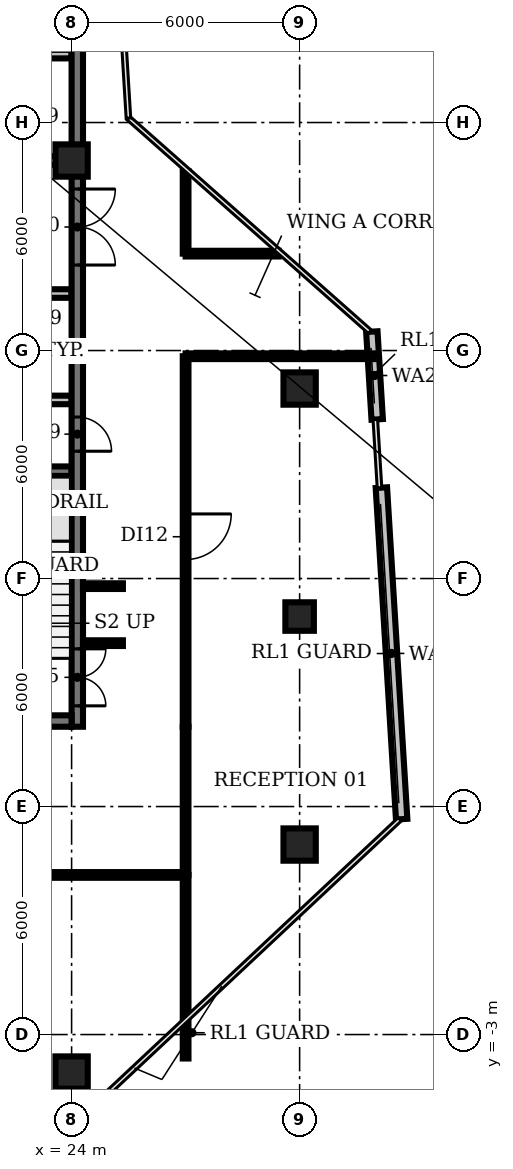
"""IFC4 building model, lengths in metres.
Left out: names, types, materials, properties, quantities, classifications, styles, units other than length and angle.
Written with IfcOpenShell. Run it as: python <this file> out.ifc"""

import sys

from ifc_helpers import new_model, si_unit, direction, frame, frame_2d, origin, origin_2d, place, context, subcontext, project, spatial, rectangle, circle, extrude, element, fill, save


model = new_model("IFC4")
c1 = context("Model", 3, precision=1e-05, world=origin(), true_north=direction((0.0, 1.0)))
c2 = subcontext(c1, "Body", "Model", "MODEL_VIEW")
j1 = project(units=[si_unit("LENGTHUNIT", "METRE"), si_unit("PLANEANGLEUNIT", "RADIAN")], contexts=[c1])
p1 = place(None, origin())
s1 = spatial("IfcSite", under=j1, at=p1, CompositionType="ELEMENT")
p2 = place(p1, origin())
s2 = spatial("IfcBuilding", under=s1, at=p2, CompositionType="ELEMENT")
p3 = place(p2, frame((0.0, 0.0, 302.0)))
s3 = spatial("IfcBuildingStorey", under=s2, at=p3, CompositionType="ELEMENT", Elevation=302.0)
for number, where, z_axis, x_axis in (
    (1, (24.0, -4.0, 0.0), (0.0, 0.0, 1.0), (1.0, 0.0, 0.0)),
    (2, (24.0, 20.0, 0.0), (0.0, 0.0, 1.0), (1.0, 0.0, 0.0)),
    (3, (30.0, 2.0, 0.0), (0.0, 0.0, 1.0), (1.0, 0.0, 0.0)),
):
    element("IfcColumn", number, at=place(p3, frame(where, z_axis=z_axis, x_axis=x_axis)), inside=s3, PredefinedType="COLUMN", context=c2, shape_type="SweptSolid", body=[
        extrude(circle(Radius=0.425, at=origin_2d()), origin(), (0.0, 0.0, 1.0), 3.85),
    ])
p4 = place(p3, frame((30.0, 8.0, 0.0), z_axis=(0.0, 0.0, 1.0), x_axis=(1.0, 0.0, 0.0)))
e4 = element("IfcColumn", 4, at=p4, inside=s3, PredefinedType="COLUMN", context=c2, shape_type="SweptSolid", body=[
    extrude(rectangle(XDim=0.75, YDim=0.75, at=origin_2d()), origin(), (0.0, 0.0, 1.0), 3.85),
])
p5 = place(p3, frame((30.0, 14.0, 0.0), z_axis=(0.0, 0.0, 1.0), x_axis=(1.0, 0.0, 0.0)))
e5 = element("IfcColumn", 5, at=p5, inside=s3, PredefinedType="COLUMN", context=c2, shape_type="SweptSolid", body=[
    extrude(circle(Radius=0.425, at=origin_2d()), origin(), (0.0, 0.0, 1.0), 3.85),
])
p6 = place(p3, frame((32.685, 2.668, 0.0), z_axis=(0.0, 0.0, 1.0), x_axis=(-0.061063491269, 0.998133883822, 0.0)))
e6 = element("IfcWall", 6, at=p6, inside=s3, PredefinedType="SOLIDWALL", context=c2, shape_type="SweptSolid", body=[
    extrude(rectangle(XDim=8.74, YDim=0.3, at=frame_2d((4.37, 0.0))), origin(), (0.0, 0.0, 1.0), 3.85),
])
p7 = place(p3, frame((32.041, 13.188, 0.0), z_axis=(0.0, 0.0, 1.0), x_axis=(-0.060998486175, 0.998137858557, 0.0)))
e7 = element("IfcWall", 7, at=p7, inside=s3, PredefinedType="SOLIDWALL", context=c2, shape_type="SweptSolid", body=[
    extrude(rectangle(XDim=2.313, YDim=0.3, at=frame_2d((1.157, 0.0))), origin(), (0.0, 0.0, 1.0), 3.85),
])
p8 = place(p3, frame((20.85, 11.825, 0.0), z_axis=(0.0, 0.0, 1.0), x_axis=(1.0, 0.0, 0.0)))
e8 = element("IfcWall", 8, at=p8, inside=s3, PredefinedType="SHEAR", context=c2, shape_type="SweptSolid", body=[
    extrude(rectangle(XDim=3.15, YDim=0.25, at=frame_2d((1.575, 0.0))), origin(), (0.0, 0.0, 1.0), 3.85),
])
p9 = place(p3, frame((16.6, 13.7, 0.0), z_axis=(0.0, 0.0, 1.0), x_axis=(1.0, 0.0, 0.0)))
e9 = element("IfcWall", 9, at=p9, inside=s3, PredefinedType="PARTITIONING", context=c2, shape_type="SweptSolid", body=[
    extrude(rectangle(XDim=7.4, YDim=0.225, at=frame_2d((3.7, 0.0))), origin(), (0.0, 0.0, 1.0), 3.85),
])
p10 = place(p3, frame((9.4, 16.5, 0.0), z_axis=(0.0, 0.0, 1.0), x_axis=(1.0, 0.0, 0.0)))
e10 = element("IfcWall", 10, at=p10, inside=s3, PredefinedType="PARTITIONING", context=c2, shape_type="SweptSolid", body=[
    extrude(rectangle(XDim=14.6, YDim=0.225, at=frame_2d((7.3, 0.0))), origin(), (0.0, 0.0, 1.0), 3.85),
])
p11 = place(p10, frame((0.85, 0.0, 0.0)))
e11 = element("IfcOpeningElement", 11, at=p11, cuts=e10, PredefinedType="OPENING", context=c2, shape_type="SweptSolid", body=[
    extrude(rectangle(XDim=0.9, YDim=2.1, at=frame_2d((0.45, 1.05))), frame((0.0, 0.123, 0.0), z_axis=(0.0, -1.0, 0.0), x_axis=(1.0, 0.0, 0.0)), (0.0, 0.0, 1.0), 0.245),
])
p12 = place(p10, frame((3.625, 0.0, 0.0)))
e12 = element("IfcOpeningElement", 12, at=p12, cuts=e10, PredefinedType="OPENING", context=c2, shape_type="SweptSolid", body=[
    extrude(rectangle(XDim=0.9, YDim=2.1, at=frame_2d((0.45, 1.05))), frame((0.0, 0.123, 0.0), z_axis=(0.0, -1.0, 0.0), x_axis=(1.0, 0.0, 0.0)), (0.0, 0.0, 1.0), 0.245),
])
p13 = place(p10, frame((7.775, 0.0, 0.0)))
e13 = element("IfcOpeningElement", 13, at=p13, cuts=e10, PredefinedType="OPENING", context=c2, shape_type="SweptSolid", body=[
    extrude(rectangle(XDim=1.0, YDim=2.1, at=frame_2d((0.5, 1.05))), frame((0.0, 0.123, 0.0), z_axis=(0.0, -1.0, 0.0), x_axis=(1.0, 0.0, 0.0)), (0.0, 0.0, 1.0), 0.245),
])
p14 = place(p10, frame((11.308, 0.0, 0.0)))
e14 = element("IfcOpeningElement", 14, at=p14, cuts=e10, PredefinedType="OPENING", context=c2, shape_type="SweptSolid", body=[
    extrude(rectangle(XDim=0.9, YDim=2.1, at=frame_2d((0.45, 1.05))), frame((0.0, 0.123, 0.0), z_axis=(0.0, -1.0, 0.0), x_axis=(1.0, 0.0, 0.0)), (0.0, 0.0, 1.0), 0.245),
])
p15 = place(p10, frame((13.083, 0.0, 0.0)))
e15 = element("IfcOpeningElement", 15, at=p15, cuts=e10, PredefinedType="OPENING", context=c2, shape_type="SweptSolid", body=[
    extrude(rectangle(XDim=0.9, YDim=2.1, at=frame_2d((0.45, 1.05))), frame((0.0, 0.123, 0.0), z_axis=(0.0, -1.0, 0.0), x_axis=(1.0, 0.0, 0.0)), (0.0, 0.0, 1.0), 0.245),
])
p16 = place(p3, frame((24.0, 20.0, 0.0), z_axis=(0.0, 0.0, 1.0), x_axis=(-1.0, 0.0, 0.0)))
e16 = element("IfcWall", 16, at=p16, inside=s3, PredefinedType="PARTITIONING", context=c2, shape_type="SweptSolid", body=[
    extrude(rectangle(XDim=14.6, YDim=0.225, at=frame_2d((7.3, 0.0))), origin(), (0.0, 0.0, 1.0), 3.85),
])
p17 = place(p16, frame((12.75, 0.0, 0.0)))
e17 = element("IfcOpeningElement", 17, at=p17, cuts=e16, PredefinedType="OPENING", context=c2, shape_type="SweptSolid", body=[
    extrude(rectangle(XDim=1.1, YDim=2.1, at=frame_2d((0.55, 1.05))), frame((0.0, 0.123, 0.0), z_axis=(0.0, -1.0, 0.0), x_axis=(1.0, 0.0, 0.0)), (0.0, 0.0, 1.0), 0.245),
])
p18 = place(p16, frame((9.95, 0.0, 0.0)))
e18 = element("IfcOpeningElement", 18, at=p18, cuts=e16, PredefinedType="OPENING", context=c2, shape_type="SweptSolid", body=[
    extrude(rectangle(XDim=1.1, YDim=2.1, at=frame_2d((0.55, 1.05))), frame((0.0, 0.123, 0.0), z_axis=(0.0, -1.0, 0.0), x_axis=(1.0, 0.0, 0.0)), (0.0, 0.0, 1.0), 0.245),
])
p19 = place(p16, frame((7.15, 0.0, 0.0)))
e19 = element("IfcOpeningElement", 19, at=p19, cuts=e16, PredefinedType="OPENING", context=c2, shape_type="SweptSolid", body=[
    extrude(rectangle(XDim=1.1, YDim=2.1, at=frame_2d((0.55, 1.05))), frame((0.0, 0.123, 0.0), z_axis=(0.0, -1.0, 0.0), x_axis=(1.0, 0.0, 0.0)), (0.0, 0.0, 1.0), 0.245),
])
p20 = place(p16, frame((4.35, 0.0, 0.0)))
e20 = element("IfcOpeningElement", 20, at=p20, cuts=e16, PredefinedType="OPENING", context=c2, shape_type="SweptSolid", body=[
    extrude(rectangle(XDim=1.1, YDim=2.1, at=frame_2d((0.55, 1.05))), frame((0.0, 0.123, 0.0), z_axis=(0.0, -1.0, 0.0), x_axis=(1.0, 0.0, 0.0)), (0.0, 0.0, 1.0), 0.245),
])
p21 = place(p16, frame((2.308, 0.0, 0.0)))
e21 = element("IfcOpeningElement", 21, at=p21, cuts=e16, PredefinedType="OPENING", context=c2, shape_type="SweptSolid", body=[
    extrude(rectangle(XDim=0.9, YDim=2.1, at=frame_2d((0.45, 1.05))), frame((0.0, 0.123, 0.0), z_axis=(0.0, -1.0, 0.0), x_axis=(1.0, 0.0, 0.0)), (0.0, 0.0, 1.0), 0.245),
])
p22 = place(p16, frame((0.633, 0.0, 0.0)))
e22 = element("IfcOpeningElement", 22, at=p22, cuts=e16, PredefinedType="OPENING", context=c2, shape_type="SweptSolid", body=[
    extrude(rectangle(XDim=0.9, YDim=2.1, at=frame_2d((0.45, 1.05))), frame((0.0, 0.123, 0.0), z_axis=(0.0, -1.0, 0.0), x_axis=(1.0, 0.0, 0.0)), (0.0, 0.0, 1.0), 0.245),
])
p23 = place(p3, frame((9.4, 22.8, 0.0), z_axis=(0.0, 0.0, 1.0), x_axis=(1.0, 0.0, 0.0)))
e23 = element("IfcWall", 23, at=p23, inside=s3, PredefinedType="PARTITIONING", context=c2, shape_type="SweptSolid", body=[
    extrude(rectangle(XDim=14.6, YDim=0.225, at=frame_2d((7.3, 0.0))), origin(), (0.0, 0.0, 1.0), 3.85),
])
p24 = place(p3, frame((24.15, 25.655, 0.0), z_axis=(0.0, 0.0, 1.0), x_axis=(0.0, -1.0, 0.0)))
e24 = element("IfcWall", 24, at=p24, inside=s3, PredefinedType="SHEAR", context=c2, shape_type="SweptSolid", body=[
    extrude(rectangle(XDim=20.555, YDim=0.3, at=frame_2d((10.277, 0.0))), origin(), (0.0, 0.0, 1.0), 3.85),
])
p25 = place(p24, frame((18.505, 0.0, 0.0)))
e25 = element("IfcOpeningElement", 25, at=p25, cuts=e24, PredefinedType="OPENING", context=c2, shape_type="SweptSolid", body=[
    extrude(rectangle(XDim=1.5, YDim=2.1, at=frame_2d((0.75, 1.05))), frame((0.0, 0.16, 0.0), z_axis=(0.0, -1.0, 0.0), x_axis=(1.0, 0.0, 0.0)), (0.0, 0.0, 1.0), 0.32),
])
p26 = place(p24, frame((12.405, 0.0, 0.0)))
e26 = element("IfcOpeningElement", 26, at=p26, cuts=e24, PredefinedType="OPENING", context=c2, shape_type="SweptSolid", body=[
    extrude(rectangle(XDim=0.9, YDim=2.1, at=frame_2d((0.45, 1.05))), frame((0.0, 0.16, 0.0), z_axis=(0.0, -1.0, 0.0), x_axis=(1.0, 0.0, 0.0)), (0.0, 0.0, 1.0), 0.32),
])
p27 = place(p24, frame((6.405, 0.0, 0.0)))
e27 = element("IfcOpeningElement", 27, at=p27, cuts=e24, PredefinedType="OPENING", context=c2, shape_type="SweptSolid", body=[
    extrude(rectangle(XDim=2.0, YDim=2.1, at=frame_2d((1.0, 1.05))), frame((0.0, 0.16, 0.0), z_axis=(0.0, -1.0, 0.0), x_axis=(1.0, 0.0, 0.0)), (0.0, 0.0, 1.0), 0.32),
])
p28 = place(p3, frame((24.0, 5.25, 0.0), z_axis=(0.0, 0.0, 1.0), x_axis=(-1.0, 0.0, 0.0)))
e28 = element("IfcWall", 28, at=p28, inside=s3, PredefinedType="SHEAR", context=c2, shape_type="SweptSolid", body=[
    extrude(rectangle(XDim=18.0, YDim=0.3, at=frame_2d((9.0, 0.0))), origin(), (0.0, 0.0, 1.0), 3.85),
])
p29 = place(p28, frame((13.0, 0.0, 0.0)))
e29 = element("IfcOpeningElement", 29, at=p29, cuts=e28, PredefinedType="OPENING", context=c2, shape_type="SweptSolid", body=[
    extrude(rectangle(XDim=1.2, YDim=2.1, at=frame_2d((0.6, 1.05))), frame((0.0, 0.16, 0.0), z_axis=(0.0, -1.0, 0.0), x_axis=(1.0, 0.0, 0.0)), (0.0, 0.0, 1.0), 0.32),
])
p30 = place(p28, frame((4.9, 0.0, 0.0)))
e30 = element("IfcOpeningElement", 30, at=p30, cuts=e28, PredefinedType="OPENING", context=c2, shape_type="SweptSolid", body=[
    extrude(rectangle(XDim=1.0, YDim=2.1, at=frame_2d((0.5, 1.05))), frame((0.0, 0.16, 0.0), z_axis=(0.0, -1.0, 0.0), x_axis=(1.0, 0.0, 0.0)), (0.0, 0.0, 1.0), 0.32),
])
for number, where, z_axis, x_axis in (
    (31, (24.3, 7.3, 0.0), (0.0, 0.0, 1.0), (1.0, 0.0, 0.0)),
    (32, (24.3, 8.8, 0.0), (0.0, 0.0, 1.0), (1.0, 0.0, 0.0)),
):
    element("IfcWall", number, at=place(p3, frame(where, z_axis=z_axis, x_axis=x_axis)), inside=s3, PredefinedType="PARTITIONING", context=c2, shape_type="SweptSolid", body=[
        extrude(rectangle(XDim=1.05, YDim=0.15, at=frame_2d((0.525, 0.0))), origin(), (0.0, 0.0, 1.0), 2.9),
    ])
p31 = place(p3, frame((27.0, -3.63, 0.0), z_axis=(0.0, 0.0, 1.0), x_axis=(0.0, 1.0, 0.0)))
e33 = element("IfcWall", 33, at=p31, inside=s3, PredefinedType="PARTITIONING", context=c2, shape_type="SweptSolid", body=[
    extrude(rectangle(XDim=4.83, YDim=0.15, at=frame_2d((2.415, 0.0))), origin(), (0.0, 0.0, 1.0), 2.9),
])
p32 = place(p3, frame((27.0, 1.2, 0.0), z_axis=(0.0, 0.0, 1.0), x_axis=(-1.0, 0.0, 0.0)))
e34 = element("IfcWall", 34, at=p32, inside=s3, PredefinedType="PARTITIONING", context=c2, shape_type="SweptSolid", body=[
    extrude(rectangle(XDim=24.0, YDim=0.15, at=frame_2d((12.0, 0.0))), origin(), (0.0, 0.0, 1.0), 2.9),
])
p33 = place(p32, frame((11.5, 0.0, 0.0)))
e35 = element("IfcOpeningElement", 35, at=p33, cuts=e34, PredefinedType="OPENING", context=c2, shape_type="SweptSolid", body=[
    extrude(rectangle(XDim=1.2, YDim=2.1, at=frame_2d((0.6, 1.05))), frame((0.0, 0.085, 0.0), z_axis=(0.0, -1.0, 0.0), x_axis=(1.0, 0.0, 0.0)), (0.0, 0.0, 1.0), 0.17),
])
p34 = place(p3, frame((27.0, 1.2, 0.0), z_axis=(0.0, 0.0, 1.0), x_axis=(0.0, 1.0, 0.0)))
e36 = element("IfcWall", 36, at=p34, inside=s3, PredefinedType="PARTITIONING", context=c2, shape_type="SweptSolid", body=[
    extrude(rectangle(XDim=3.9, YDim=0.15, at=frame_2d((1.95, 0.0))), origin(), (0.0, 0.0, 1.0), 2.9),
])
p35 = place(p3, frame((27.0, 14.85, 0.0), z_axis=(0.0, 0.0, 1.0), x_axis=(0.0, -1.0, 0.0)))
e37 = element("IfcWall", 37, at=p35, inside=s3, PredefinedType="PARTITIONING", context=c2, shape_type="SweptSolid", body=[
    extrude(rectangle(XDim=9.75, YDim=0.15, at=frame_2d((4.875, 0.0))), origin(), (0.0, 0.0, 1.0), 2.9),
])
p36 = place(p35, frame((4.15, 0.0, 0.0)))
e38 = element("IfcOpeningElement", 38, at=p36, cuts=e37, PredefinedType="OPENING", context=c2, shape_type="SweptSolid", body=[
    extrude(rectangle(XDim=1.2, YDim=2.1, at=frame_2d((0.6, 1.05))), frame((0.0, 0.085, 0.0), z_axis=(0.0, -1.0, 0.0), x_axis=(1.0, 0.0, 0.0)), (0.0, 0.0, 1.0), 0.17),
])
p37 = place(p3, frame((27.0, 14.85, 0.0), z_axis=(0.0, 0.0, 1.0), x_axis=(1.0, 0.0, 0.0)))
e39 = element("IfcWall", 39, at=p37, inside=s3, PredefinedType="PARTITIONING", context=c2, shape_type="SweptSolid", body=[
    extrude(rectangle(XDim=4.95, YDim=0.15, at=frame_2d((2.475, 0.0))), origin(), (0.0, 0.0, 1.0), 2.9),
])
p38 = place(p3, frame((27.0, 17.55, 0.0), z_axis=(0.0, 0.0, 1.0), x_axis=(0.0, 1.0, 0.0)))
e40 = element("IfcWall", 40, at=p38, inside=s3, PredefinedType="PARTITIONING", context=c2, shape_type="SweptSolid", body=[
    extrude(rectangle(XDim=2.17, YDim=0.15, at=frame_2d((1.085, 0.0))), origin(), (0.0, 0.0, 1.0), 2.9),
])
p39 = place(p3, frame((27.0, 17.55, 0.0), z_axis=(0.0, 0.0, 1.0), x_axis=(1.0, 0.0, 0.0)))
e41 = element("IfcWall", 41, at=p39, inside=s3, PredefinedType="PARTITIONING", context=c2, shape_type="SweptSolid", body=[
    extrude(rectangle(XDim=2.45, YDim=0.15, at=frame_2d((1.225, 0.0))), origin(), (0.0, 0.0, 1.0), 2.9),
])
p40 = place(p25, origin())
e42 = element("IfcDoor", 42, at=p40, inside=s3, OperationType="DOUBLE_DOOR_SINGLE_SWING", PredefinedType="DOOR", context=c2, shape_type="SweptSolid", body=[
    extrude(rectangle(XDim=1.5, YDim=2.1, at=frame_2d((0.75, 1.05))), frame((0.0, 0.025, 0.0), z_axis=(0.0, -1.0, 0.0), x_axis=(1.0, 0.0, 0.0)), (0.0, 0.0, 1.0), 0.05),
])
fill(e25, e42)
p41 = place(p26, origin())
e43 = element("IfcDoor", 43, at=p41, inside=s3, OperationType="SINGLE_SWING_RIGHT", PredefinedType="DOOR", context=c2, shape_type="SweptSolid", body=[
    extrude(rectangle(XDim=0.9, YDim=2.1, at=frame_2d((0.45, 1.05))), frame((0.0, 0.025, 0.0), z_axis=(0.0, -1.0, 0.0), x_axis=(1.0, 0.0, 0.0)), (0.0, 0.0, 1.0), 0.05),
])
fill(e26, e43)
p42 = place(p27, origin())
e44 = element("IfcDoor", 44, at=p42, inside=s3, OperationType="DOUBLE_DOOR_SINGLE_SWING", PredefinedType="DOOR", context=c2, shape_type="SweptSolid", body=[
    extrude(rectangle(XDim=2.0, YDim=2.1, at=frame_2d((1.0, 1.05))), frame((0.0, 0.025, 0.0), z_axis=(0.0, -1.0, 0.0), x_axis=(1.0, 0.0, 0.0)), (0.0, 0.0, 1.0), 0.05),
])
fill(e27, e44)
p43 = place(p36, origin())
e45 = element("IfcDoor", 45, at=p43, inside=s3, OperationType="SINGLE_SWING_LEFT", PredefinedType="DOOR", context=c2, shape_type="SweptSolid", body=[
    extrude(rectangle(XDim=1.2, YDim=2.1, at=frame_2d((0.6, 1.05))), frame((0.0, 0.025, 0.0), z_axis=(0.0, -1.0, 0.0), x_axis=(1.0, 0.0, 0.0)), (0.0, 0.0, 1.0), 0.05),
])
fill(e38, e45)
save(model, sys.argv[1])
